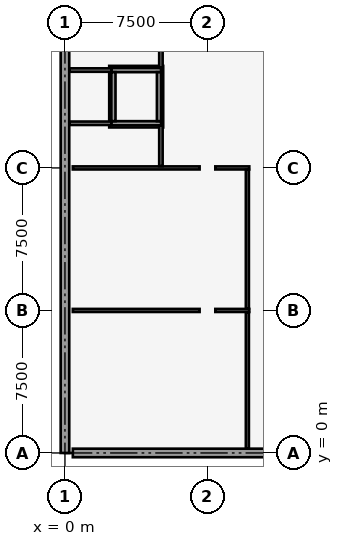
"""IFC4 building model, lengths in metres.
Left out: names, types, materials, properties, quantities, classifications, styles, units other than length and angle.
Written with IfcOpenShell. Run it as: python <this file> out.ifc"""

import sys

from ifc_helpers import new_model, si_unit, direction, frame, frame_2d, origin, origin_2d, place, context, subcontext, project, spatial, rectangle, extrude, element, fill, save


model = new_model("IFC4")
c1 = context("Model", 3, precision=1e-05, world=origin(), true_north=direction((0.0, 1.0)))
c2 = subcontext(c1, "Body", "Model", "MODEL_VIEW")
j1 = project(units=[si_unit("LENGTHUNIT", "METRE"), si_unit("PLANEANGLEUNIT", "RADIAN")], contexts=[c1])
p1 = place(None, origin())
s1 = spatial("IfcSite", under=j1, at=p1, CompositionType="ELEMENT")
p2 = place(p1, origin())
s2 = spatial("IfcBuilding", under=s1, at=p2, CompositionType="ELEMENT")
p3 = place(p2, frame((0.0, 0.0, -4.8)))
s3 = spatial("IfcBuildingStorey", under=s2, at=p3, CompositionType="ELEMENT", Elevation=-4.8)
for number, where, z_axis, x_axis in (
    (1, (0.0, 0.0, 0.0), (0.0, 0.0, 1.0), (1.0, 0.0, 0.0)),
    (2, (0.0, 7.5, 0.0), (0.0, 0.0, 1.0), (1.0, 0.0, 0.0)),
    (3, (0.0, 15.0, 0.0), (0.0, 0.0, 1.0), (1.0, 0.0, 0.0)),
    (4, (7.5, 0.0, 0.0), (0.0, 0.0, 1.0), (1.0, 0.0, 0.0)),
    (5, (7.5, 7.5, 0.0), (0.0, 0.0, 1.0), (1.0, 0.0, 0.0)),
    (6, (7.5, 15.0, 0.0), (0.0, 0.0, 1.0), (1.0, 0.0, 0.0)),
):
    element("IfcColumn", number, at=place(p3, frame(where, z_axis=z_axis, x_axis=x_axis)), inside=s3, PredefinedType="COLUMN", context=c2, shape_type="SweptSolid", body=[
        extrude(rectangle(XDim=0.8, YDim=0.8, at=origin_2d()), origin(), (0.0, 0.0, 1.0), 4.8),
    ])
p4 = place(p3, frame((0.0, 0.0, 0.0), z_axis=(0.0, 0.0, 1.0), x_axis=(0.0, 1.0, 0.0)))
e7 = element("IfcWall", 7, at=p4, inside=s3, PredefinedType="USERDEFINED", context=c2, shape_type="SweptSolid", body=[
    extrude(rectangle(XDim=26.25, YDim=0.45, at=frame_2d((13.125, 0.0))), origin(), (0.0, 0.0, 1.0), 4.5),
])
p5 = place(p3, frame((0.415, 0.0, 0.0), z_axis=(0.0, 0.0, 1.0), x_axis=(1.0, 0.0, 0.0)))
e8 = element("IfcWall", 8, at=p5, inside=s3, PredefinedType="USERDEFINED", context=c2, shape_type="SweptSolid", body=[
    extrude(rectangle(XDim=18.335, YDim=0.45, at=frame_2d((9.167, 0.0))), origin(), (0.0, 0.0, 1.0), 4.5),
])
for number, where, z_axis, x_axis in (
    (9, (2.44, 17.35, 0.0), (0.0, 0.0, 1.0), (1.0, 0.0, 0.0)),
    (10, (2.44, 20.15, 0.0), (0.0, 0.0, 1.0), (1.0, 0.0, 0.0)),
):
    element("IfcWall", number, at=place(p3, frame(where, z_axis=z_axis, x_axis=x_axis)), inside=s3, PredefinedType="SOLIDWALL", context=c2, shape_type="SweptSolid", body=[
        extrude(rectangle(XDim=2.62, YDim=0.22, at=frame_2d((1.31, 0.0))), origin(), (0.0, 0.0, 1.0), 4.5),
    ])
p6 = place(p3, frame((2.55, 17.46, 0.0), z_axis=(0.0, 0.0, 1.0), x_axis=(0.0, 1.0, 0.0)))
e11 = element("IfcWall", 11, at=p6, inside=s3, PredefinedType="SOLIDWALL", context=c2, shape_type="SweptSolid", body=[
    extrude(rectangle(XDim=2.58, YDim=0.22, at=frame_2d((1.29, 0.0))), origin(), (0.0, 0.0, 1.0), 4.5),
])
p7 = place(p3, frame((4.95, 17.46, 0.0), z_axis=(0.0, 0.0, 1.0), x_axis=(0.0, 1.0, 0.0)))
e12 = element("IfcWall", 12, at=p7, inside=s3, PredefinedType="SOLIDWALL", context=c2, shape_type="SweptSolid", body=[
    extrude(rectangle(XDim=2.58, YDim=0.22, at=frame_2d((1.29, 0.0))), origin(), (0.0, 0.0, 1.0), 4.5),
])
p8 = place(p7, frame((0.79, 0.0, 0.0)))
e13 = element("IfcOpeningElement", 13, at=p8, cuts=e12, PredefinedType="OPENING", context=c2, shape_type="SweptSolid", body=[
    extrude(rectangle(XDim=1.0, YDim=2.15, at=frame_2d((0.5, 1.075))), frame((0.0, 0.12, 0.0), z_axis=(0.0, -1.0, 0.0), x_axis=(1.0, 0.0, 0.0)), (0.0, 0.0, 1.0), 0.24),
])
p9 = place(p3, frame((0.414, 7.5, 0.0), z_axis=(0.0, 0.0, 1.0), x_axis=(1.0, 0.0, 0.0)))
e14 = element("IfcWall", 14, at=p9, inside=s3, PredefinedType="PARTITIONING", context=c2, shape_type="SweptSolid", body=[
    extrude(rectangle(XDim=6.672, YDim=0.16, at=frame_2d((3.336, 0.0))), origin(), (0.0, 0.0, 1.0), 3.42),
])
p10 = place(p3, frame((7.914, 7.5, 0.0), z_axis=(0.0, 0.0, 1.0), x_axis=(1.0, 0.0, 0.0)))
e15 = element("IfcWall", 15, at=p10, inside=s3, PredefinedType="PARTITIONING", context=c2, shape_type="SweptSolid", body=[
    extrude(rectangle(XDim=1.786, YDim=0.16, at=frame_2d((0.893, 0.0))), origin(), (0.0, 0.0, 1.0), 3.42),
])
p11 = place(p3, frame((0.414, 15.0, 0.0), z_axis=(0.0, 0.0, 1.0), x_axis=(1.0, 0.0, 0.0)))
e16 = element("IfcWall", 16, at=p11, inside=s3, PredefinedType="PARTITIONING", context=c2, shape_type="SweptSolid", body=[
    extrude(rectangle(XDim=6.672, YDim=0.16, at=frame_2d((3.336, 0.0))), origin(), (0.0, 0.0, 1.0), 3.42),
])
p12 = place(p3, frame((7.914, 15.0, 0.0), z_axis=(0.0, 0.0, 1.0), x_axis=(1.0, 0.0, 0.0)))
e17 = element("IfcWall", 17, at=p12, inside=s3, PredefinedType="PARTITIONING", context=c2, shape_type="SweptSolid", body=[
    extrude(rectangle(XDim=1.786, YDim=0.16, at=frame_2d((0.893, 0.0))), origin(), (0.0, 0.0, 1.0), 3.42),
])
p13 = place(p3, frame((9.6, 0.239, 0.0), z_axis=(0.0, 0.0, 1.0), x_axis=(0.0, 1.0, 0.0)))
e18 = element("IfcWall", 18, at=p13, inside=s3, PredefinedType="PARTITIONING", context=c2, shape_type="SweptSolid", body=[
    extrude(rectangle(XDim=7.167, YDim=0.16, at=frame_2d((3.583, 0.0))), origin(), (0.0, 0.0, 1.0), 3.42),
])
p14 = place(p13, frame((3.061, 0.0, 0.0)))
e19 = element("IfcOpeningElement", 19, at=p14, cuts=e18, PredefinedType="OPENING", context=c2, shape_type="SweptSolid", body=[
    extrude(rectangle(XDim=0.9, YDim=2.1, at=frame_2d((0.45, 1.05))), frame((0.0, 0.09, 0.0), z_axis=(0.0, -1.0, 0.0), x_axis=(1.0, 0.0, 0.0)), (0.0, 0.0, 1.0), 0.18),
])
p15 = place(p3, frame((9.6, 7.594, 0.0), z_axis=(0.0, 0.0, 1.0), x_axis=(0.0, 1.0, 0.0)))
e20 = element("IfcWall", 20, at=p15, inside=s3, PredefinedType="PARTITIONING", context=c2, shape_type="SweptSolid", body=[
    extrude(rectangle(XDim=7.312, YDim=0.16, at=frame_2d((3.656, 0.0))), origin(), (0.0, 0.0, 1.0), 3.42),
])
p16 = place(p15, frame((3.206, 0.0, 0.0)))
e21 = element("IfcOpeningElement", 21, at=p16, cuts=e20, PredefinedType="OPENING", context=c2, shape_type="SweptSolid", body=[
    extrude(rectangle(XDim=0.9, YDim=2.1, at=frame_2d((0.45, 1.05))), frame((0.0, 0.09, 0.0), z_axis=(0.0, -1.0, 0.0), x_axis=(1.0, 0.0, 0.0)), (0.0, 0.0, 1.0), 0.18),
])
for number, where, z_axis, x_axis in (
    (22, (0.239, 17.35, 0.0), (0.0, 0.0, 1.0), (1.0, 0.0, 0.0)),
    (23, (0.239, 20.15, 0.0), (0.0, 0.0, 1.0), (1.0, 0.0, 0.0)),
):
    element("IfcWall", number, at=place(p3, frame(where, z_axis=z_axis, x_axis=x_axis)), inside=s3, PredefinedType="PARTITIONING", context=c2, shape_type="SweptSolid", body=[
        extrude(rectangle(XDim=2.201, YDim=0.18, at=frame_2d((1.101, 0.0))), origin(), (0.0, 0.0, 1.0), 3.87),
    ])
p17 = place(p3, frame((5.05, 15.094, 0.0), z_axis=(0.0, 0.0, 1.0), x_axis=(0.0, 1.0, 0.0)))
e24 = element("IfcWall", 24, at=p17, inside=s3, PredefinedType="PARTITIONING", context=c2, shape_type="SweptSolid", body=[
    extrude(rectangle(XDim=2.132, YDim=0.18, at=frame_2d((1.066, 0.0))), origin(), (0.0, 0.0, 1.0), 3.67),
])
p18 = place(p3, frame((5.05, 20.274, 0.0), z_axis=(0.0, 0.0, 1.0), x_axis=(0.0, 1.0, 0.0)))
e25 = element("IfcWall", 25, at=p18, inside=s3, PredefinedType="PARTITIONING", context=c2, shape_type="SweptSolid", body=[
    extrude(rectangle(XDim=3.462, YDim=0.18, at=frame_2d((1.731, 0.0))), origin(), (0.0, 0.0, 1.0), 3.67),
])
p19 = place(p8, origin())
e26 = element("IfcDoor", 26, at=p19, inside=s3, OperationType="SLIDING_TO_LEFT", PredefinedType="DOOR", context=c2, shape_type="SweptSolid", body=[
    extrude(rectangle(XDim=1.0, YDim=2.15, at=frame_2d((0.5, 1.075))), frame((0.0, 0.025, 0.0), z_axis=(0.0, -1.0, 0.0), x_axis=(1.0, 0.0, 0.0)), (0.0, 0.0, 1.0), 0.05),
])
fill(e13, e26)
p20 = place(p14, origin())
e27 = element("IfcDoor", 27, at=p20, inside=s3, OperationType="SINGLE_SWING_LEFT", PredefinedType="DOOR", context=c2, shape_type="SweptSolid", body=[
    extrude(rectangle(XDim=0.9, YDim=2.1, at=frame_2d((0.45, 1.05))), frame((0.0, 0.025, 0.0), z_axis=(0.0, -1.0, 0.0), x_axis=(1.0, 0.0, 0.0)), (0.0, 0.0, 1.0), 0.05),
])
fill(e19, e27)
p21 = place(p16, origin())
e28 = element("IfcDoor", 28, at=p21, inside=s3, OperationType="SINGLE_SWING_RIGHT", PredefinedType="DOOR", context=c2, shape_type="SweptSolid", body=[
    extrude(rectangle(XDim=0.9, YDim=2.1, at=frame_2d((0.45, 1.05))), frame((0.0, 0.025, 0.0), z_axis=(0.0, -1.0, 0.0), x_axis=(1.0, 0.0, 0.0)), (0.0, 0.0, 1.0), 0.05),
])
fill(e21, e28)
save(model, sys.argv[1])
